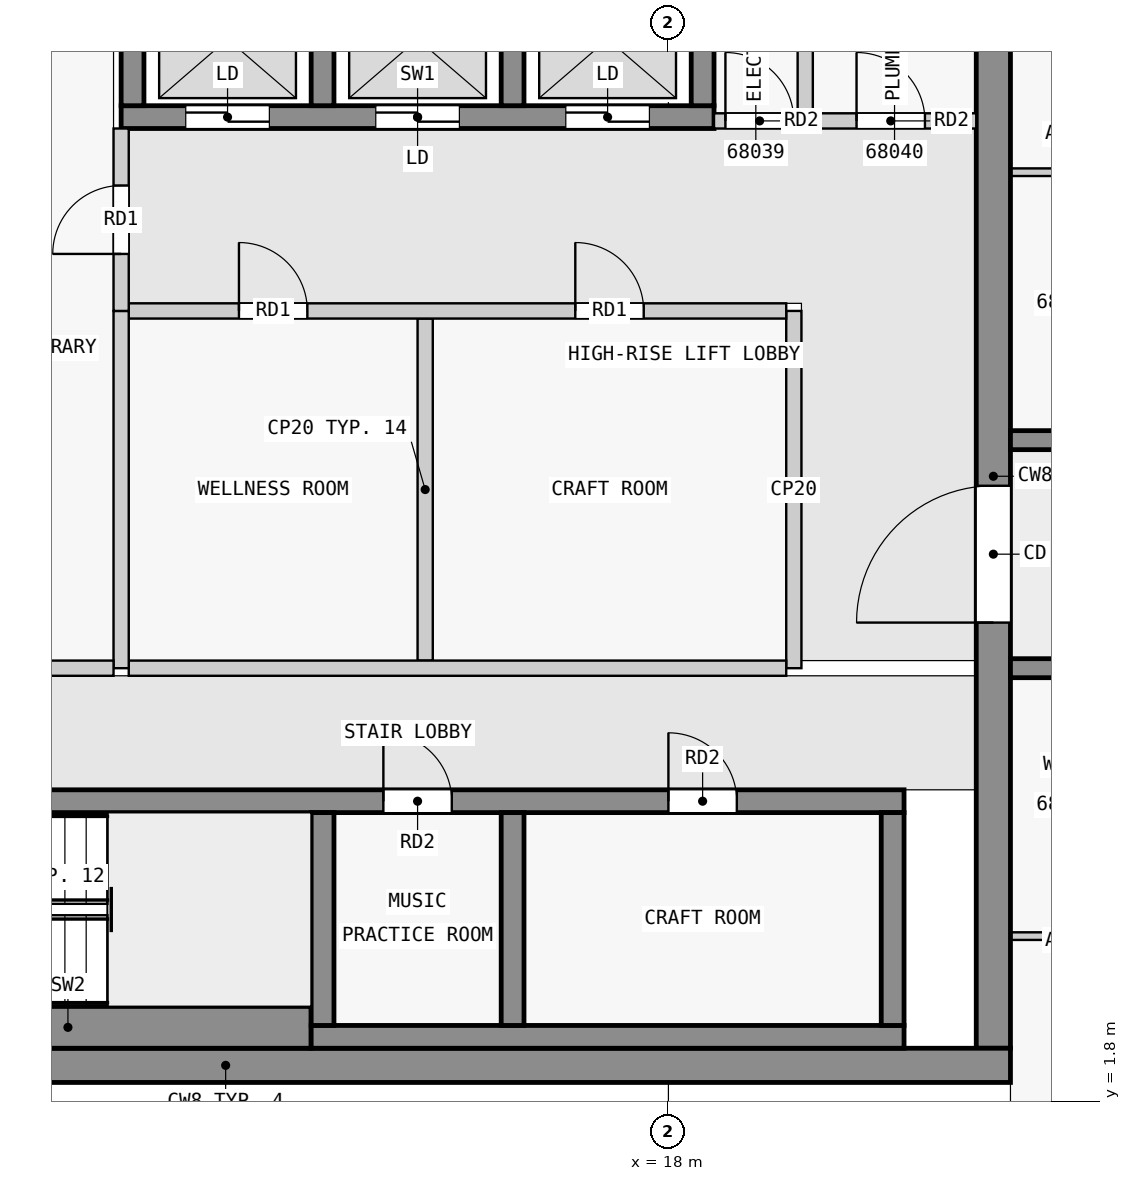
"""IFC4 building model, lengths in metres.
Left out: names, types, materials, properties, quantities, classifications, styles, units other than length and angle.
Written with IfcOpenShell. Run it as: python <this file> out.ifc"""

import sys

from ifc_helpers import new_model, si_unit, direction, frame, frame_2d, origin, place, context, subcontext, project, spatial, rectangle, extrude, element, fill, save


model = new_model("IFC4")
c1 = context("Model", 3, precision=1e-05, world=origin(), true_north=direction((0.0, 1.0)))
c2 = subcontext(c1, "Body", "Model", "MODEL_VIEW")
j1 = project(units=[si_unit("LENGTHUNIT", "METRE"), si_unit("PLANEANGLEUNIT", "RADIAN")], contexts=[c1])
p1 = place(None, origin())
s1 = spatial("IfcSite", under=j1, at=p1, CompositionType="ELEMENT")
p2 = place(p1, origin())
s2 = spatial("IfcBuilding", under=s1, at=p2, CompositionType="ELEMENT")
p3 = place(p2, frame((0.0, 0.0, 259.9)))
s3 = spatial("IfcBuildingStorey", under=s2, at=p3, CompositionType="ELEMENT", Elevation=259.9)
p4 = place(p3, frame((1.85, 2.275, 0.0), z_axis=(0.0, 0.0, 1.0), x_axis=(1.0, 0.0, 0.0)))
e1 = element("IfcWall", 1, at=p4, inside=s3, PredefinedType="SHEAR", context=c2, shape_type="SweptSolid", body=[
    extrude(rectangle(XDim=20.65, YDim=0.45, at=frame_2d((10.325, 0.0))), origin(), (0.0, 0.0, 1.0), 3.25),
])
p5 = place(p3, frame((22.275, 2.5, 0.0), z_axis=(0.0, 0.0, 1.0), x_axis=(0.0, 1.0, 0.0)))
e2 = element("IfcWall", 2, at=p5, inside=s3, PredefinedType="SHEAR", context=c2, shape_type="SweptSolid", body=[
    extrude(rectangle(XDim=15.05, YDim=0.45, at=frame_2d((7.525, 0.0))), origin(), (0.0, 0.0, 1.0), 3.25),
])
p6 = place(p5, frame((5.6, 0.0, 0.0)))
e3 = element("IfcOpeningElement", 3, at=p6, cuts=e2, PredefinedType="OPENING", context=c2, shape_type="SweptSolid", body=[
    extrude(rectangle(XDim=1.8, YDim=2.1, at=frame_2d((0.9, 1.05))), frame((0.0, 0.235, 0.0), z_axis=(0.0, -1.0, 0.0), x_axis=(1.0, 0.0, 0.0)), (0.0, 0.0, 1.0), 0.47),
])
p7 = place(p3, frame((6.9, 2.775, 0.0), z_axis=(0.0, 0.0, 1.0), x_axis=(1.0, 0.0, 0.0)))
e4 = element("IfcWall", 4, at=p7, inside=s3, PredefinedType="SHEAR", context=c2, shape_type="SweptSolid", body=[
    extrude(rectangle(XDim=6.4, YDim=0.55, at=frame_2d((3.2, 0.0))), origin(), (0.0, 0.0, 1.0), 3.25),
])
p8 = place(p3, frame((13.3, 2.65, 0.0), z_axis=(0.0, 0.0, 1.0), x_axis=(1.0, 0.0, 0.0)))
e5 = element("IfcWall", 5, at=p8, inside=s3, PredefinedType="SHEAR", context=c2, shape_type="SweptSolid", body=[
    extrude(rectangle(XDim=7.8, YDim=0.3, at=frame_2d((3.9, 0.0))), origin(), (0.0, 0.0, 1.0), 3.25),
])
for number, where, z_axis, x_axis in (
    (6, (13.45, 2.8, 0.0), (0.0, 0.0, 1.0), (0.0, 1.0, 0.0)),
    (7, (15.95, 2.8, 0.0), (0.0, 0.0, 1.0), (0.0, 1.0, 0.0)),
    (8, (20.95, 2.8, 0.0), (0.0, 0.0, 1.0), (0.0, 1.0, 0.0)),
):
    element("IfcWall", number, at=place(p3, frame(where, z_axis=z_axis, x_axis=x_axis)), inside=s3, PredefinedType="SHEAR", context=c2, shape_type="SweptSolid", body=[
        extrude(rectangle(XDim=2.8, YDim=0.3, at=frame_2d((1.4, 0.0))), origin(), (0.0, 0.0, 1.0), 3.25),
    ])
p9 = place(p3, frame((2.3, 5.75, 0.0), z_axis=(0.0, 0.0, 1.0), x_axis=(1.0, 0.0, 0.0)))
e9 = element("IfcWall", 9, at=p9, inside=s3, PredefinedType="SHEAR", context=c2, shape_type="SweptSolid", body=[
    extrude(rectangle(XDim=18.8, YDim=0.3, at=frame_2d((9.4, 0.0))), origin(), (0.0, 0.0, 1.0), 3.25),
])
p10 = place(p9, frame((4.65, 0.0, 0.0)))
e10 = element("IfcOpeningElement", 10, at=p10, cuts=e9, PredefinedType="OPENING", context=c2, shape_type="SweptSolid", body=[
    extrude(rectangle(XDim=1.1, YDim=2.1, at=frame_2d((0.55, 1.05))), frame((0.0, 0.16, 0.0), z_axis=(0.0, -1.0, 0.0), x_axis=(1.0, 0.0, 0.0)), (0.0, 0.0, 1.0), 0.32),
])
p11 = place(p9, frame((0.45, 0.0, 0.0)))
e11 = element("IfcOpeningElement", 11, at=p11, cuts=e9, PredefinedType="OPENING", context=c2, shape_type="SweptSolid", body=[
    extrude(rectangle(XDim=1.1, YDim=2.1, at=frame_2d((0.55, 1.05))), frame((0.0, 0.16, 0.0), z_axis=(0.0, -1.0, 0.0), x_axis=(1.0, 0.0, 0.0)), (0.0, 0.0, 1.0), 0.32),
])
p12 = place(p9, frame((2.75, 0.0, 0.0)))
e12 = element("IfcOpeningElement", 12, at=p12, cuts=e9, PredefinedType="OPENING", context=c2, shape_type="SweptSolid", body=[
    extrude(rectangle(XDim=1.1, YDim=2.1, at=frame_2d((0.55, 1.05))), frame((0.0, 0.16, 0.0), z_axis=(0.0, -1.0, 0.0), x_axis=(1.0, 0.0, 0.0)), (0.0, 0.0, 1.0), 0.32),
])
p13 = place(p9, frame((11.95, 0.0, 0.0)))
e13 = element("IfcOpeningElement", 13, at=p13, cuts=e9, PredefinedType="OPENING", context=c2, shape_type="SweptSolid", body=[
    extrude(rectangle(XDim=0.9, YDim=2.1, at=frame_2d((0.45, 1.05))), frame((0.0, 0.16, 0.0), z_axis=(0.0, -1.0, 0.0), x_axis=(1.0, 0.0, 0.0)), (0.0, 0.0, 1.0), 0.32),
])
p14 = place(p9, frame((15.7, 0.0, 0.0)))
e14 = element("IfcOpeningElement", 14, at=p14, cuts=e9, PredefinedType="OPENING", context=c2, shape_type="SweptSolid", body=[
    extrude(rectangle(XDim=0.9, YDim=2.1, at=frame_2d((0.45, 1.05))), frame((0.0, 0.16, 0.0), z_axis=(0.0, -1.0, 0.0), x_axis=(1.0, 0.0, 0.0)), (0.0, 0.0, 1.0), 0.32),
])
p15 = place(p3, frame((10.8, 14.75, 0.0), z_axis=(0.0, 0.0, 1.0), x_axis=(1.0, 0.0, 0.0)))
e15 = element("IfcWall", 15, at=p15, inside=s3, PredefinedType="SHEAR", context=c2, shape_type="SweptSolid", body=[
    extrude(rectangle(XDim=7.8, YDim=0.3, at=frame_2d((3.9, 0.0))), origin(), (0.0, 0.0, 1.0), 3.25),
])
p16 = place(p15, frame((0.85, 0.0, 0.0)))
e16 = element("IfcOpeningElement", 16, at=p16, cuts=e15, PredefinedType="OPENING", context=c2, shape_type="SweptSolid", body=[
    extrude(rectangle(XDim=1.1, YDim=2.1, at=frame_2d((0.55, 1.05))), frame((0.0, 0.16, 0.0), z_axis=(0.0, -1.0, 0.0), x_axis=(1.0, 0.0, 0.0)), (0.0, 0.0, 1.0), 0.32),
])
p17 = place(p15, frame((3.35, 0.0, 0.0)))
e17 = element("IfcOpeningElement", 17, at=p17, cuts=e15, PredefinedType="OPENING", context=c2, shape_type="SweptSolid", body=[
    extrude(rectangle(XDim=1.1, YDim=2.1, at=frame_2d((0.55, 1.05))), frame((0.0, 0.16, 0.0), z_axis=(0.0, -1.0, 0.0), x_axis=(1.0, 0.0, 0.0)), (0.0, 0.0, 1.0), 0.32),
])
p18 = place(p15, frame((5.85, 0.0, 0.0)))
e18 = element("IfcOpeningElement", 18, at=p18, cuts=e15, PredefinedType="OPENING", context=c2, shape_type="SweptSolid", body=[
    extrude(rectangle(XDim=1.1, YDim=2.1, at=frame_2d((0.55, 1.05))), frame((0.0, 0.16, 0.0), z_axis=(0.0, -1.0, 0.0), x_axis=(1.0, 0.0, 0.0)), (0.0, 0.0, 1.0), 0.32),
])
for number, where, z_axis, x_axis in (
    (19, (10.95, 14.9, 0.0), (0.0, 0.0, 1.0), (0.0, 1.0, 0.0)),
    (20, (13.45, 14.9, 0.0), (0.0, 0.0, 1.0), (0.0, 1.0, 0.0)),
    (21, (15.95, 14.9, 0.0), (0.0, 0.0, 1.0), (0.0, 1.0, 0.0)),
    (22, (18.45, 14.9, 0.0), (0.0, 0.0, 1.0), (0.0, 1.0, 0.0)),
):
    element("IfcWall", number, at=place(p3, frame(where, z_axis=z_axis, x_axis=x_axis)), inside=s3, PredefinedType="SHEAR", context=c2, shape_type="SweptSolid", body=[
        extrude(rectangle(XDim=2.0, YDim=0.3, at=frame_2d((1.0, 0.0))), origin(), (0.0, 0.0, 1.0), 3.25),
    ])
p19 = place(p3, frame((22.5, 7.5, 0.0), z_axis=(0.0, 0.0, 1.0), x_axis=(1.0, 0.0, 0.0)))
e23 = element("IfcWall", 23, at=p19, inside=s3, PredefinedType="SHEAR", context=c2, shape_type="SweptSolid", body=[
    extrude(rectangle(XDim=22.5, YDim=0.25, at=frame_2d((11.25, 0.0))), origin(), (0.0, 0.0, 1.0), 3.25),
])
p20 = place(p19, frame((1.75, 0.0, 0.0)))
e24 = element("IfcOpeningElement", 24, at=p20, cuts=e23, PredefinedType="OPENING", context=c2, shape_type="SweptSolid", body=[
    extrude(rectangle(XDim=1.0, YDim=2.1, at=frame_2d((0.5, 1.05))), frame((0.0, 0.135, 0.0), z_axis=(0.0, -1.0, 0.0), x_axis=(1.0, 0.0, 0.0)), (0.0, 0.0, 1.0), 0.27),
])
p21 = place(p19, frame((5.85, 0.0, 0.0)))
e25 = element("IfcOpeningElement", 25, at=p21, cuts=e23, PredefinedType="OPENING", context=c2, shape_type="SweptSolid", body=[
    extrude(rectangle(XDim=1.8, YDim=2.1, at=frame_2d((0.9, 1.05))), frame((0.0, 0.135, 0.0), z_axis=(0.0, -1.0, 0.0), x_axis=(1.0, 0.0, 0.0)), (0.0, 0.0, 1.0), 0.27),
])
p22 = place(p19, frame((10.75, 0.0, 0.0)))
e26 = element("IfcOpeningElement", 26, at=p22, cuts=e23, PredefinedType="OPENING", context=c2, shape_type="SweptSolid", body=[
    extrude(rectangle(XDim=1.0, YDim=2.1, at=frame_2d((0.5, 1.05))), frame((0.0, 0.135, 0.0), z_axis=(0.0, -1.0, 0.0), x_axis=(1.0, 0.0, 0.0)), (0.0, 0.0, 1.0), 0.27),
])
p23 = place(p19, frame((15.25, 0.0, 0.0)))
e27 = element("IfcOpeningElement", 27, at=p23, cuts=e23, PredefinedType="OPENING", context=c2, shape_type="SweptSolid", body=[
    extrude(rectangle(XDim=1.0, YDim=2.1, at=frame_2d((0.5, 1.05))), frame((0.0, 0.135, 0.0), z_axis=(0.0, -1.0, 0.0), x_axis=(1.0, 0.0, 0.0)), (0.0, 0.0, 1.0), 0.27),
])
p24 = place(p19, frame((18.75, 0.0, 0.0)))
e28 = element("IfcOpeningElement", 28, at=p24, cuts=e23, PredefinedType="OPENING", context=c2, shape_type="SweptSolid", body=[
    extrude(rectangle(XDim=0.9, YDim=2.1, at=frame_2d((0.45, 1.05))), frame((0.0, 0.135, 0.0), z_axis=(0.0, -1.0, 0.0), x_axis=(1.0, 0.0, 0.0)), (0.0, 0.0, 1.0), 0.27),
])
p25 = place(p19, frame((20.95, 0.0, 0.0)))
e29 = element("IfcOpeningElement", 29, at=p25, cuts=e23, PredefinedType="OPENING", context=c2, shape_type="SweptSolid", body=[
    extrude(rectangle(XDim=1.0, YDim=2.1, at=frame_2d((0.5, 1.05))), frame((0.0, 0.135, 0.0), z_axis=(0.0, -1.0, 0.0), x_axis=(1.0, 0.0, 0.0)), (0.0, 0.0, 1.0), 0.27),
])
p26 = place(p3, frame((22.5, 10.5, 0.0), z_axis=(0.0, 0.0, 1.0), x_axis=(1.0, 0.0, 0.0)))
e30 = element("IfcWall", 30, at=p26, inside=s3, PredefinedType="SHEAR", context=c2, shape_type="SweptSolid", body=[
    extrude(rectangle(XDim=22.5, YDim=0.25, at=frame_2d((11.25, 0.0))), origin(), (0.0, 0.0, 1.0), 3.25),
])
p27 = place(p26, frame((1.75, 0.0, 0.0)))
e31 = element("IfcOpeningElement", 31, at=p27, cuts=e30, PredefinedType="OPENING", context=c2, shape_type="SweptSolid", body=[
    extrude(rectangle(XDim=1.0, YDim=2.1, at=frame_2d((0.5, 1.05))), frame((0.0, 0.135, 0.0), z_axis=(0.0, -1.0, 0.0), x_axis=(1.0, 0.0, 0.0)), (0.0, 0.0, 1.0), 0.27),
])
p28 = place(p26, frame((6.25, 0.0, 0.0)))
e32 = element("IfcOpeningElement", 32, at=p28, cuts=e30, PredefinedType="OPENING", context=c2, shape_type="SweptSolid", body=[
    extrude(rectangle(XDim=1.0, YDim=2.1, at=frame_2d((0.5, 1.05))), frame((0.0, 0.135, 0.0), z_axis=(0.0, -1.0, 0.0), x_axis=(1.0, 0.0, 0.0)), (0.0, 0.0, 1.0), 0.27),
])
p29 = place(p26, frame((10.75, 0.0, 0.0)))
e33 = element("IfcOpeningElement", 33, at=p29, cuts=e30, PredefinedType="OPENING", context=c2, shape_type="SweptSolid", body=[
    extrude(rectangle(XDim=1.0, YDim=2.1, at=frame_2d((0.5, 1.05))), frame((0.0, 0.135, 0.0), z_axis=(0.0, -1.0, 0.0), x_axis=(1.0, 0.0, 0.0)), (0.0, 0.0, 1.0), 0.27),
])
p30 = place(p26, frame((16.85, 0.0, 0.0)))
e34 = element("IfcOpeningElement", 34, at=p30, cuts=e30, PredefinedType="OPENING", context=c2, shape_type="SweptSolid", body=[
    extrude(rectangle(XDim=1.0, YDim=2.1, at=frame_2d((0.5, 1.05))), frame((0.0, 0.135, 0.0), z_axis=(0.0, -1.0, 0.0), x_axis=(1.0, 0.0, 0.0)), (0.0, 0.0, 1.0), 0.27),
])
p31 = place(p3, frame((7.1, 7.5, 0.0), z_axis=(0.0, 0.0, 1.0), x_axis=(1.0, 0.0, 0.0)))
e35 = element("IfcWall", 35, at=p31, inside=s3, PredefinedType="PARTITIONING", context=c2, shape_type="SweptSolid", body=[
    extrude(rectangle(XDim=3.6, YDim=0.2, at=frame_2d((1.8, 0.0))), origin(), (0.0, 0.0, 1.0), 3.25),
])
p32 = place(p3, frame((10.8, 12.2, 0.0), z_axis=(0.0, 0.0, 1.0), x_axis=(0.0, 1.0, 0.0)))
e36 = element("IfcWall", 36, at=p32, inside=s3, PredefinedType="PARTITIONING", context=c2, shape_type="SweptSolid", body=[
    extrude(rectangle(XDim=2.4, YDim=0.2, at=frame_2d((1.2, 0.0))), origin(), (0.0, 0.0, 1.0), 3.25),
])
p33 = place(p32, frame((0.75, 0.0, 0.0)))
e37 = element("IfcOpeningElement", 37, at=p33, cuts=e36, PredefinedType="OPENING", context=c2, shape_type="SweptSolid", body=[
    extrude(rectangle(XDim=0.9, YDim=2.1, at=frame_2d((0.45, 1.05))), frame((0.0, 0.11, 0.0), z_axis=(0.0, -1.0, 0.0), x_axis=(1.0, 0.0, 0.0)), (0.0, 0.0, 1.0), 0.22),
])
p34 = place(p3, frame((10.8, 7.5, 0.0), z_axis=(0.0, 0.0, 1.0), x_axis=(0.0, 1.0, 0.0)))
e38 = element("IfcWall", 38, at=p34, inside=s3, PredefinedType="PARTITIONING", context=c2, shape_type="SweptSolid", body=[
    extrude(rectangle(XDim=4.7, YDim=0.2, at=frame_2d((2.35, 0.0))), origin(), (0.0, 0.0, 1.0), 3.25),
])
p35 = place(p3, frame((10.9, 7.5, 0.0), z_axis=(0.0, 0.0, 1.0), x_axis=(1.0, 0.0, 0.0)))
e39 = element("IfcWall", 39, at=p35, inside=s3, PredefinedType="PARTITIONING", context=c2, shape_type="SweptSolid", body=[
    extrude(rectangle(XDim=8.65, YDim=0.2, at=frame_2d((4.325, 0.0))), origin(), (0.0, 0.0, 1.0), 3.25),
])
p36 = place(p3, frame((19.65, 7.5, 0.0), z_axis=(0.0, 0.0, 1.0), x_axis=(0.0, 1.0, 0.0)))
e40 = element("IfcWall", 40, at=p36, inside=s3, PredefinedType="PARTITIONING", context=c2, shape_type="SweptSolid", body=[
    extrude(rectangle(XDim=4.7, YDim=0.2, at=frame_2d((2.35, 0.0))), origin(), (0.0, 0.0, 1.0), 3.25),
])
p37 = place(p3, frame((10.9, 12.2, 0.0), z_axis=(0.0, 0.0, 1.0), x_axis=(1.0, 0.0, 0.0)))
e41 = element("IfcWall", 41, at=p37, inside=s3, PredefinedType="PARTITIONING", context=c2, shape_type="SweptSolid", body=[
    extrude(rectangle(XDim=8.65, YDim=0.2, at=frame_2d((4.325, 0.0))), origin(), (0.0, 0.0, 1.0), 3.25),
])
p38 = place(p37, frame((1.45, 0.0, 0.0)))
e42 = element("IfcOpeningElement", 42, at=p38, cuts=e41, PredefinedType="OPENING", context=c2, shape_type="SweptSolid", body=[
    extrude(rectangle(XDim=0.9, YDim=2.1, at=frame_2d((0.45, 1.05))), frame((0.0, 0.11, 0.0), z_axis=(0.0, -1.0, 0.0), x_axis=(1.0, 0.0, 0.0)), (0.0, 0.0, 1.0), 0.22),
])
p39 = place(p37, frame((5.875, 0.0, 0.0)))
e43 = element("IfcOpeningElement", 43, at=p39, cuts=e41, PredefinedType="OPENING", context=c2, shape_type="SweptSolid", body=[
    extrude(rectangle(XDim=0.9, YDim=2.1, at=frame_2d((0.45, 1.05))), frame((0.0, 0.11, 0.0), z_axis=(0.0, -1.0, 0.0), x_axis=(1.0, 0.0, 0.0)), (0.0, 0.0, 1.0), 0.22),
])
p40 = place(p3, frame((14.8, 7.6, 0.0), z_axis=(0.0, 0.0, 1.0), x_axis=(0.0, 1.0, 0.0)))
e44 = element("IfcWall", 44, at=p40, inside=s3, PredefinedType="PARTITIONING", context=c2, shape_type="SweptSolid", body=[
    extrude(rectangle(XDim=4.5, YDim=0.2, at=frame_2d((2.25, 0.0))), origin(), (0.0, 0.0, 1.0), 3.25),
])
p41 = place(p3, frame((18.6, 14.7, 0.0), z_axis=(0.0, 0.0, 1.0), x_axis=(1.0, 0.0, 0.0)))
e45 = element("IfcWall", 45, at=p41, inside=s3, PredefinedType="PARTITIONING", context=c2, shape_type="SweptSolid", body=[
    extrude(rectangle(XDim=3.45, YDim=0.2, at=frame_2d((1.725, 0.0))), origin(), (0.0, 0.0, 1.0), 3.25),
])
p42 = place(p41, frame((0.15, 0.0, 0.0)))
e46 = element("IfcOpeningElement", 46, at=p42, cuts=e45, PredefinedType="OPENING", context=c2, shape_type="SweptSolid", body=[
    extrude(rectangle(XDim=0.9, YDim=2.1, at=frame_2d((0.45, 1.05))), frame((0.0, 0.11, 0.0), z_axis=(0.0, -1.0, 0.0), x_axis=(1.0, 0.0, 0.0)), (0.0, 0.0, 1.0), 0.22),
])
p43 = place(p41, frame((1.875, 0.0, 0.0)))
e47 = element("IfcOpeningElement", 47, at=p43, cuts=e45, PredefinedType="OPENING", context=c2, shape_type="SweptSolid", body=[
    extrude(rectangle(XDim=0.9, YDim=2.1, at=frame_2d((0.45, 1.05))), frame((0.0, 0.11, 0.0), z_axis=(0.0, -1.0, 0.0), x_axis=(1.0, 0.0, 0.0)), (0.0, 0.0, 1.0), 0.22),
])
p44 = place(p3, frame((19.8, 14.8, 0.0), z_axis=(0.0, 0.0, 1.0), x_axis=(0.0, 1.0, 0.0)))
e48 = element("IfcWall", 48, at=p44, inside=s3, PredefinedType="PARTITIONING", context=c2, shape_type="SweptSolid", body=[
    extrude(rectangle(XDim=2.75, YDim=0.2, at=frame_2d((1.375, 0.0))), origin(), (0.0, 0.0, 1.0), 3.25),
])
for number, where, z_axis, x_axis in (
    (49, (22.5, 3.975, 0.0), (0.0, 0.0, 1.0), (1.0, 0.0, 0.0)),
    (50, (23.95, 14.025, 0.0), (0.0, 0.0, 1.0), (-1.0, 0.0, 0.0)),
):
    element("IfcWall", number, at=place(p3, frame(where, z_axis=z_axis, x_axis=x_axis)), inside=s3, PredefinedType="PARTITIONING", context=c2, shape_type="SweptSolid", body=[
        extrude(rectangle(XDim=1.45, YDim=0.1, at=frame_2d((0.725, 0.0))), origin(), (0.0, 0.0, 1.0), 3.25),
    ])
p45 = place(p33, origin())
e51 = element("IfcDoor", 51, at=p45, inside=s3, OperationType="SINGLE_SWING_LEFT", PredefinedType="DOOR", context=c2, shape_type="SweptSolid", body=[
    extrude(rectangle(XDim=0.9, YDim=2.1, at=frame_2d((0.45, 1.05))), frame((0.0, 0.025, 0.0), z_axis=(0.0, -1.0, 0.0), x_axis=(1.0, 0.0, 0.0)), (0.0, 0.0, 1.0), 0.05),
])
fill(e37, e51)
p46 = place(p38, origin())
e52 = element("IfcDoor", 52, at=p46, inside=s3, OperationType="SINGLE_SWING_LEFT", PredefinedType="DOOR", context=c2, shape_type="SweptSolid", body=[
    extrude(rectangle(XDim=0.9, YDim=2.1, at=frame_2d((0.45, 1.05))), frame((0.0, 0.025, 0.0), z_axis=(0.0, -1.0, 0.0), x_axis=(1.0, 0.0, 0.0)), (0.0, 0.0, 1.0), 0.05),
])
fill(e42, e52)
p47 = place(p39, origin())
e53 = element("IfcDoor", 53, at=p47, inside=s3, OperationType="SINGLE_SWING_LEFT", PredefinedType="DOOR", context=c2, shape_type="SweptSolid", body=[
    extrude(rectangle(XDim=0.9, YDim=2.1, at=frame_2d((0.45, 1.05))), frame((0.0, 0.025, 0.0), z_axis=(0.0, -1.0, 0.0), x_axis=(1.0, 0.0, 0.0)), (0.0, 0.0, 1.0), 0.05),
])
fill(e43, e53)
p48 = place(p16, origin())
e54 = element("IfcDoor", 54, at=p48, inside=s3, OperationType="DOUBLE_DOOR_SLIDING", PredefinedType="DOOR", context=c2, shape_type="SweptSolid", body=[
    extrude(rectangle(XDim=1.1, YDim=2.1, at=frame_2d((0.55, 1.05))), frame((0.0, 0.025, 0.0), z_axis=(0.0, -1.0, 0.0), x_axis=(1.0, 0.0, 0.0)), (0.0, 0.0, 1.0), 0.05),
])
fill(e16, e54)
p49 = place(p17, origin())
e55 = element("IfcDoor", 55, at=p49, inside=s3, OperationType="DOUBLE_DOOR_SLIDING", PredefinedType="DOOR", context=c2, shape_type="SweptSolid", body=[
    extrude(rectangle(XDim=1.1, YDim=2.1, at=frame_2d((0.55, 1.05))), frame((0.0, 0.025, 0.0), z_axis=(0.0, -1.0, 0.0), x_axis=(1.0, 0.0, 0.0)), (0.0, 0.0, 1.0), 0.05),
])
fill(e17, e55)
p50 = place(p18, origin())
e56 = element("IfcDoor", 56, at=p50, inside=s3, OperationType="DOUBLE_DOOR_SLIDING", PredefinedType="DOOR", context=c2, shape_type="SweptSolid", body=[
    extrude(rectangle(XDim=1.1, YDim=2.1, at=frame_2d((0.55, 1.05))), frame((0.0, 0.025, 0.0), z_axis=(0.0, -1.0, 0.0), x_axis=(1.0, 0.0, 0.0)), (0.0, 0.0, 1.0), 0.05),
])
fill(e18, e56)
p51 = place(p6, origin())
e57 = element("IfcDoor", 57, at=p51, inside=s3, OperationType="DOUBLE_DOOR_SINGLE_SWING", PredefinedType="DOOR", context=c2, shape_type="SweptSolid", body=[
    extrude(rectangle(XDim=1.8, YDim=2.1, at=frame_2d((0.9, 1.05))), frame((0.0, 0.025, 0.0), z_axis=(0.0, -1.0, 0.0), x_axis=(1.0, 0.0, 0.0)), (0.0, 0.0, 1.0), 0.05),
])
fill(e3, e57)
p52 = place(p42, origin())
e58 = element("IfcDoor", 58, at=p52, inside=s3, OperationType="SINGLE_SWING_LEFT", PredefinedType="DOOR", context=c2, shape_type="SweptSolid", body=[
    extrude(rectangle(XDim=0.9, YDim=2.1, at=frame_2d((0.45, 1.05))), frame((0.0, 0.025, 0.0), z_axis=(0.0, -1.0, 0.0), x_axis=(1.0, 0.0, 0.0)), (0.0, 0.0, 1.0), 0.05),
])
fill(e46, e58)
p53 = place(p43, origin())
e59 = element("IfcDoor", 59, at=p53, inside=s3, OperationType="SINGLE_SWING_LEFT", PredefinedType="DOOR", context=c2, shape_type="SweptSolid", body=[
    extrude(rectangle(XDim=0.9, YDim=2.1, at=frame_2d((0.45, 1.05))), frame((0.0, 0.025, 0.0), z_axis=(0.0, -1.0, 0.0), x_axis=(1.0, 0.0, 0.0)), (0.0, 0.0, 1.0), 0.05),
])
fill(e47, e59)
p54 = place(p13, origin())
e60 = element("IfcDoor", 60, at=p54, inside=s3, OperationType="SINGLE_SWING_LEFT", PredefinedType="DOOR", context=c2, shape_type="SweptSolid", body=[
    extrude(rectangle(XDim=0.9, YDim=2.1, at=frame_2d((0.45, 1.05))), frame((0.0, 0.025, 0.0), z_axis=(0.0, -1.0, 0.0), x_axis=(1.0, 0.0, 0.0)), (0.0, 0.0, 1.0), 0.05),
])
fill(e13, e60)
p55 = place(p14, origin())
e61 = element("IfcDoor", 61, at=p55, inside=s3, OperationType="SINGLE_SWING_LEFT", PredefinedType="DOOR", context=c2, shape_type="SweptSolid", body=[
    extrude(rectangle(XDim=0.9, YDim=2.1, at=frame_2d((0.45, 1.05))), frame((0.0, 0.025, 0.0), z_axis=(0.0, -1.0, 0.0), x_axis=(1.0, 0.0, 0.0)), (0.0, 0.0, 1.0), 0.05),
])
fill(e14, e61)
save(model, sys.argv[1])
